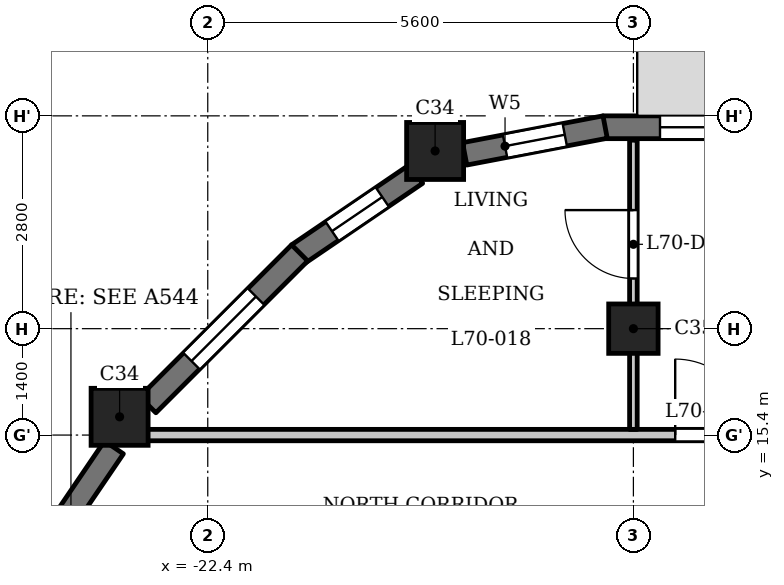
"""IFC4 building model, lengths in metres.
Left out: names, types, materials, properties, quantities, classifications, styles, units other than length and angle.
Written with IfcOpenShell. Run it as: python <this file> out.ifc"""

import sys

from ifc_helpers import new_model, si_unit, direction, frame, frame_2d, origin, origin_2d, place, context, subcontext, project, spatial, rectangle, extrude, element, fill, save


model = new_model("IFC4")
c1 = context("Model", 3, precision=1e-05, world=origin(), true_north=direction((0.0, 1.0)))
c2 = subcontext(c1, "Body", "Model", "MODEL_VIEW")
j1 = project(units=[si_unit("LENGTHUNIT", "METRE"), si_unit("PLANEANGLEUNIT", "RADIAN")], contexts=[c1])
p1 = place(None, origin())
s1 = spatial("IfcSite", under=j1, at=p1, CompositionType="ELEMENT")
p2 = place(p1, origin())
s2 = spatial("IfcBuilding", under=s1, at=p2, CompositionType="ELEMENT")
p3 = place(p2, frame((0.0, 0.0, 269.7)))
s3 = spatial("IfcBuildingStorey", under=s2, at=p3, CompositionType="ELEMENT", Elevation=269.7)
for number, where, z_axis, x_axis in (
    (1, (-19.409, 19.138, 0.0), (0.0, 0.0, 1.0), (1.0, 0.0, 0.0)),
    (2, (-23.56, 15.64, 0.0), (0.0, 0.0, 1.0), (1.0, 0.0, 0.0)),
):
    element("IfcColumn", number, at=place(p3, frame(where, z_axis=z_axis, x_axis=x_axis)), inside=s3, PredefinedType="COLUMN", context=c2, shape_type="SweptSolid", body=[
        extrude(rectangle(XDim=0.75, YDim=0.75, at=origin_2d()), origin(), (0.0, 0.0, 1.0), 3.5),
    ])
p4 = place(p3, frame((-16.8, 16.8, 0.0), z_axis=(0.0, 0.0, 1.0), x_axis=(1.0, 0.0, 0.0)))
e3 = element("IfcColumn", 3, at=p4, inside=s3, PredefinedType="COLUMN", context=c2, shape_type="SweptSolid", body=[
    extrude(rectangle(XDim=0.65, YDim=0.65, at=origin_2d()), origin(), (0.0, 0.0, 1.0), 3.5),
])
p5 = place(p3, frame((-14.375, 19.45, 0.0), z_axis=(0.0, 0.0, 1.0), x_axis=(-1.0, 0.0, 0.0)))
e4 = element("IfcWall", 4, at=p5, inside=s3, PredefinedType="SOLIDWALL", context=c2, shape_type="SweptSolid", body=[
    extrude(rectangle(XDim=2.825, YDim=0.3, at=frame_2d((1.413, 0.0))), origin(), (0.0, 0.0, 1.0), 2.55),
])
p6 = place(p5, frame((0.275, 0.0, 0.9)))
e5 = element("IfcOpeningElement", 5, at=p6, cuts=e4, PredefinedType="OPENING", context=c2, shape_type="SweptSolid", body=[
    extrude(rectangle(XDim=1.8, YDim=1.25, at=frame_2d((0.9, 0.625))), frame((0.0, 0.16, 0.0), z_axis=(0.0, -1.0, 0.0), x_axis=(1.0, 0.0, 0.0)), (0.0, 0.0, 1.0), 0.32),
])
p7 = place(p3, frame((-17.172, 19.453, 0.0), z_axis=(0.0, 0.0, 1.0), x_axis=(-0.982284001233, -0.187398348234, 0.0)))
e6 = element("IfcWall", 6, at=p7, inside=s3, PredefinedType="SOLIDWALL", context=c2, shape_type="SweptSolid", body=[
    extrude(rectangle(XDim=1.881, YDim=0.3, at=frame_2d((0.941, 0.0))), origin(), (0.0, 0.0, 1.0), 2.55),
])
p8 = place(p7, frame((0.541, 0.0, 0.6)))
e7 = element("IfcOpeningElement", 7, at=p8, cuts=e6, PredefinedType="OPENING", context=c2, shape_type="SweptSolid", body=[
    extrude(rectangle(XDim=0.8, YDim=1.55, at=frame_2d((0.4, 0.775))), frame((0.0, 0.16, 0.0), z_axis=(0.0, -1.0, 0.0), x_axis=(1.0, 0.0, 0.0)), (0.0, 0.0, 1.0), 0.32),
])
p9 = place(p3, frame((-19.657, 18.836, 0.0), z_axis=(0.0, 0.0, 1.0), x_axis=(-0.82704477487, -0.562136051469, 0.0)))
e8 = element("IfcWall", 8, at=p9, inside=s3, PredefinedType="SOLIDWALL", context=c2, shape_type="SweptSolid", body=[
    extrude(rectangle(XDim=1.881, YDim=0.3, at=frame_2d((0.94, 0.0))), origin(), (0.0, 0.0, 1.0), 2.55),
])
p10 = place(p9, frame((0.541, 0.0, 0.6)))
e9 = element("IfcOpeningElement", 9, at=p10, cuts=e8, PredefinedType="OPENING", context=c2, shape_type="SweptSolid", body=[
    extrude(rectangle(XDim=0.8, YDim=1.55, at=frame_2d((0.4, 0.775))), frame((0.0, 0.16, 0.0), z_axis=(0.0, -1.0, 0.0), x_axis=(1.0, 0.0, 0.0)), (0.0, 0.0, 1.0), 0.32),
])
p11 = place(p3, frame((-21.191, 17.797, 0.0), z_axis=(0.0, 0.0, 1.0), x_axis=(-0.707106781187, -0.707106781187, 0.0)))
e10 = element("IfcWall", 10, at=p11, inside=s3, PredefinedType="SOLIDWALL", context=c2, shape_type="SweptSolid", body=[
    extrude(rectangle(XDim=2.825, YDim=0.3, at=frame_2d((1.413, 0.0))), origin(), (0.0, 0.0, 1.0), 2.55),
])
p12 = place(p11, frame((0.812, 0.0, 0.6)))
e11 = element("IfcOpeningElement", 11, at=p12, cuts=e10, PredefinedType="OPENING", context=c2, shape_type="SweptSolid", body=[
    extrude(rectangle(XDim=1.2, YDim=1.55, at=frame_2d((0.6, 0.775))), frame((0.0, 0.16, 0.0), z_axis=(0.0, -1.0, 0.0), x_axis=(1.0, 0.0, 0.0)), (0.0, 0.0, 1.0), 0.32),
])
p13 = place(p3, frame((-23.634, 15.237, 0.0), z_axis=(0.0, 0.0, 1.0), x_axis=(-0.562099454787, -0.827069648173, 0.0)))
e12 = element("IfcWall", 12, at=p13, inside=s3, PredefinedType="SOLIDWALL", context=c2, shape_type="SweptSolid", body=[
    extrude(rectangle(XDim=1.427, YDim=0.3, at=frame_2d((0.714, 0.0))), origin(), (0.0, 0.0, 1.0), 2.55),
])
p14 = place(p3, frame((-23.55, 15.4, 0.0), z_axis=(0.0, 0.0, 1.0), x_axis=(1.0, 0.0, 0.0)))
e13 = element("IfcWall", 13, at=p14, inside=s3, PredefinedType="PARTITIONING", context=c2, shape_type="SweptSolid", body=[
    extrude(rectangle(XDim=46.872, YDim=0.15, at=frame_2d((23.436, 0.0))), origin(), (0.0, 0.0, 1.0), 3.2),
])
p15 = place(p14, frame((7.3, 0.0, 0.0)))
e14 = element("IfcOpeningElement", 14, at=p15, cuts=e13, PredefinedType="OPENING", context=c2, shape_type="SweptSolid", body=[
    extrude(rectangle(XDim=1.0, YDim=2.1, at=frame_2d((0.5, 1.05))), frame((0.0, 0.085, 0.0), z_axis=(0.0, -1.0, 0.0), x_axis=(1.0, 0.0, 0.0)), (0.0, 0.0, 1.0), 0.17),
])
p16 = place(p14, frame((16.3, 0.0, 0.0)))
e15 = element("IfcOpeningElement", 15, at=p16, cuts=e13, PredefinedType="OPENING", context=c2, shape_type="SweptSolid", body=[
    extrude(rectangle(XDim=1.0, YDim=2.1, at=frame_2d((0.5, 1.05))), frame((0.0, 0.085, 0.0), z_axis=(0.0, -1.0, 0.0), x_axis=(1.0, 0.0, 0.0)), (0.0, 0.0, 1.0), 0.17),
])
p17 = place(p14, frame((29.7, 0.0, 0.0)))
e16 = element("IfcOpeningElement", 16, at=p17, cuts=e13, PredefinedType="OPENING", context=c2, shape_type="SweptSolid", body=[
    extrude(rectangle(XDim=1.0, YDim=2.1, at=frame_2d((0.5, 1.05))), frame((0.0, 0.085, 0.0), z_axis=(0.0, -1.0, 0.0), x_axis=(1.0, 0.0, 0.0)), (0.0, 0.0, 1.0), 0.17),
])
p18 = place(p14, frame((38.7, 0.0, 0.0)))
e17 = element("IfcOpeningElement", 17, at=p18, cuts=e13, PredefinedType="OPENING", context=c2, shape_type="SweptSolid", body=[
    extrude(rectangle(XDim=1.0, YDim=2.1, at=frame_2d((0.5, 1.05))), frame((0.0, 0.085, 0.0), z_axis=(0.0, -1.0, 0.0), x_axis=(1.0, 0.0, 0.0)), (0.0, 0.0, 1.0), 0.17),
])
p19 = place(p3, frame((-16.8, 15.475, 0.0), z_axis=(0.0, 0.0, 1.0), x_axis=(0.0, 1.0, 0.0)))
e18 = element("IfcWall", 18, at=p19, inside=s3, PredefinedType="PARTITIONING", context=c2, shape_type="SweptSolid", body=[
    extrude(rectangle(XDim=3.805, YDim=0.1, at=frame_2d((1.902, 0.0))), origin(), (0.0, 0.0, 1.0), 3.2),
])
p20 = place(p19, frame((1.985, 0.0, 0.0)))
e19 = element("IfcOpeningElement", 19, at=p20, cuts=e18, PredefinedType="OPENING", context=c2, shape_type="SweptSolid", body=[
    extrude(rectangle(XDim=0.9, YDim=2.1, at=frame_2d((0.45, 1.05))), frame((0.0, 0.06, 0.0), z_axis=(0.0, -1.0, 0.0), x_axis=(1.0, 0.0, 0.0)), (0.0, 0.0, 1.0), 0.12),
])
p21 = place(p15, origin())
e20 = element("IfcDoor", 20, at=p21, inside=s3, OperationType="SINGLE_SWING_RIGHT", PredefinedType="DOOR", context=c2, shape_type="SweptSolid", body=[
    extrude(rectangle(XDim=1.0, YDim=2.1, at=frame_2d((0.5, 1.05))), frame((0.0, 0.025, 0.0), z_axis=(0.0, -1.0, 0.0), x_axis=(1.0, 0.0, 0.0)), (0.0, 0.0, 1.0), 0.05),
])
fill(e14, e20)
p22 = place(p20, origin())
e21 = element("IfcDoor", 21, at=p22, inside=s3, OperationType="SINGLE_SWING_LEFT", PredefinedType="DOOR", context=c2, shape_type="SweptSolid", body=[
    extrude(rectangle(XDim=0.9, YDim=2.1, at=frame_2d((0.45, 1.05))), frame((0.0, 0.025, 0.0), z_axis=(0.0, -1.0, 0.0), x_axis=(1.0, 0.0, 0.0)), (0.0, 0.0, 1.0), 0.05),
])
fill(e19, e21)
p23 = place(p6, origin())
e22 = element("IfcWindow", 22, at=p23, inside=s3, PartitioningType="SINGLE_PANEL", PredefinedType="WINDOW", context=c2, shape_type="SweptSolid", body=[
    extrude(rectangle(XDim=1.8, YDim=1.25, at=frame_2d((0.9, 0.625))), frame((0.0, 0.03, 0.0), z_axis=(0.0, -1.0, 0.0), x_axis=(1.0, 0.0, 0.0)), (0.0, 0.0, 1.0), 0.06),
])
fill(e5, e22)
p24 = place(p8, origin())
e23 = element("IfcWindow", 23, at=p24, inside=s3, PartitioningType="SINGLE_PANEL", PredefinedType="WINDOW", context=c2, shape_type="SweptSolid", body=[
    extrude(rectangle(XDim=0.8, YDim=1.55, at=frame_2d((0.4, 0.775))), frame((0.0, 0.03, 0.0), z_axis=(0.0, -1.0, 0.0), x_axis=(1.0, 0.0, 0.0)), (0.0, 0.0, 1.0), 0.06),
])
fill(e7, e23)
p25 = place(p10, origin())
e24 = element("IfcWindow", 24, at=p25, inside=s3, PartitioningType="SINGLE_PANEL", PredefinedType="WINDOW", context=c2, shape_type="SweptSolid", body=[
    extrude(rectangle(XDim=0.8, YDim=1.55, at=frame_2d((0.4, 0.775))), frame((0.0, 0.03, 0.0), z_axis=(0.0, -1.0, 0.0), x_axis=(1.0, 0.0, 0.0)), (0.0, 0.0, 1.0), 0.06),
])
fill(e9, e24)
p26 = place(p12, origin())
e25 = element("IfcWindow", 25, at=p26, inside=s3, PartitioningType="SINGLE_PANEL", PredefinedType="WINDOW", context=c2, shape_type="SweptSolid", body=[
    extrude(rectangle(XDim=1.2, YDim=1.55, at=frame_2d((0.6, 0.775))), frame((0.0, 0.03, 0.0), z_axis=(0.0, -1.0, 0.0), x_axis=(1.0, 0.0, 0.0)), (0.0, 0.0, 1.0), 0.06),
])
fill(e11, e25)
save(model, sys.argv[1])
